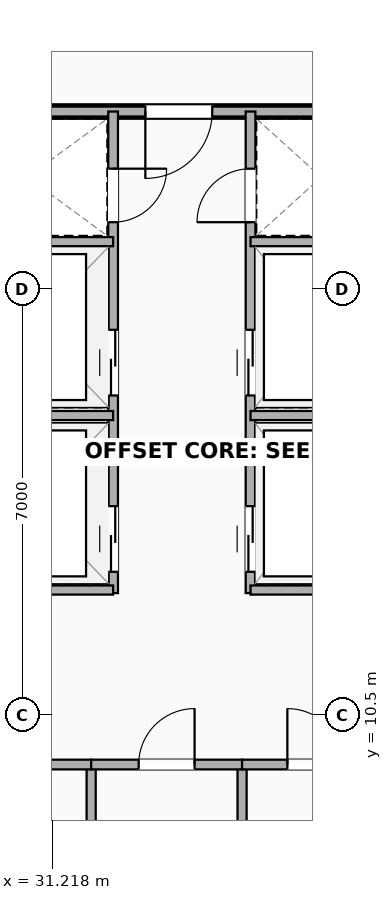
"""IFC4 building model, lengths in metres.
Left out: names, types, materials, properties, quantities, classifications, styles, units other than length and angle.
Written with IfcOpenShell. Run it as: python <this file> out.ifc"""

import sys

from ifc_helpers import new_model, si_unit, direction, frame, frame_2d, origin, place, context, subcontext, project, spatial, rectangle, extrude, element, fill, save


model = new_model("IFC4")
c1 = context("Model", 3, precision=1e-05, world=origin(), true_north=direction((0.0, 1.0)))
c2 = subcontext(c1, "Body", "Model", "MODEL_VIEW")
j1 = project(units=[si_unit("LENGTHUNIT", "METRE"), si_unit("PLANEANGLEUNIT", "RADIAN")], contexts=[c1])
p1 = place(None, origin())
s1 = spatial("IfcSite", under=j1, at=p1, CompositionType="ELEMENT")
p2 = place(p1, origin())
s2 = spatial("IfcBuilding", under=s1, at=p2, CompositionType="ELEMENT")
p3 = place(p2, frame((0.0, 0.0, 95.2)))
s3 = spatial("IfcBuildingStorey", under=s2, at=p3, CompositionType="ELEMENT", Elevation=95.2)
p4 = place(p3, frame((29.2, 20.42, 0.0), z_axis=(0.0, 0.0, 1.0), x_axis=(1.0, 0.0, 0.0)))
e1 = element("IfcWall", 1, at=p4, inside=s3, PredefinedType="PARTITIONING", context=c2, shape_type="SweptSolid", body=[
    extrude(rectangle(XDim=7.8, YDim=0.2, at=frame_2d((3.9, 0.0))), origin(), (0.0, 0.0, 1.0), 2.313),
])
p5 = place(p4, frame((3.55, 0.0, 0.0)))
e2 = element("IfcOpeningElement", 2, at=p5, cuts=e1, PredefinedType="OPENING", context=c2, shape_type="SweptSolid", body=[
    extrude(rectangle(XDim=1.1, YDim=2.15, at=frame_2d((0.55, 1.075))), frame((0.0, 0.11, 0.0), z_axis=(0.0, -1.0, 0.0), x_axis=(1.0, 0.0, 0.0)), (0.0, 0.0, 1.0), 0.22),
])
p6 = place(p3, frame((31.859, 3.95, 0.0), z_axis=(0.0, 0.0, 1.0), x_axis=(0.0, 1.0, 0.0)))
e3 = element("IfcWall", 3, at=p6, inside=s3, PredefinedType="PARTITIONING", context=c2, shape_type="SweptSolid", body=[
    extrude(rectangle(XDim=5.73, YDim=0.15, at=frame_2d((2.865, 0.0))), origin(), (0.0, 0.0, 1.0), 3.24),
])
p7 = place(p3, frame((29.45, 9.68, 0.0), z_axis=(0.0, 0.0, 1.0), x_axis=(1.0, 0.0, 0.0)))
e4 = element("IfcWall", 4, at=p7, inside=s3, PredefinedType="PARTITIONING", context=c2, shape_type="SweptSolid", body=[
    extrude(rectangle(XDim=2.409, YDim=0.16, at=frame_2d((1.205, 0.0))), origin(), (0.0, 0.0, 1.0), 3.24),
])
p8 = place(p7, frame((1.664, 0.0, 0.0), z_axis=(0.0, 0.0, 1.0), x_axis=(-1.0, 0.0, 0.0)))
e5 = element("IfcOpeningElement", 5, at=p8, cuts=e4, PredefinedType="OPENING", context=c2, shape_type="SweptSolid", body=[
    extrude(rectangle(XDim=0.92, YDim=2.08, at=frame_2d((0.46, 1.04))), frame((0.0, 0.09, 0.0), z_axis=(0.0, -1.0, 0.0), x_axis=(1.0, 0.0, 0.0)), (0.0, 0.0, 1.0), 0.18),
])
p9 = place(p3, frame((34.341, 3.95, 0.0), z_axis=(0.0, 0.0, 1.0), x_axis=(0.0, 1.0, 0.0)))
e6 = element("IfcWall", 6, at=p9, inside=s3, PredefinedType="PARTITIONING", context=c2, shape_type="SweptSolid", body=[
    extrude(rectangle(XDim=5.73, YDim=0.15, at=frame_2d((2.865, 0.0))), origin(), (0.0, 0.0, 1.0), 3.24),
])
p10 = place(p3, frame((31.859, 9.68, 0.0), z_axis=(0.0, 0.0, 1.0), x_axis=(1.0, 0.0, 0.0)))
e7 = element("IfcWall", 7, at=p10, inside=s3, PredefinedType="PARTITIONING", context=c2, shape_type="SweptSolid", body=[
    extrude(rectangle(XDim=2.482, YDim=0.16, at=frame_2d((1.241, 0.0))), origin(), (0.0, 0.0, 1.0), 3.24),
])
p11 = place(p10, frame((1.701, 0.0, 0.0), z_axis=(0.0, 0.0, 1.0), x_axis=(-1.0, 0.0, 0.0)))
e8 = element("IfcOpeningElement", 8, at=p11, cuts=e7, PredefinedType="OPENING", context=c2, shape_type="SweptSolid", body=[
    extrude(rectangle(XDim=0.92, YDim=2.08, at=frame_2d((0.46, 1.04))), frame((0.0, 0.09, 0.0), z_axis=(0.0, -1.0, 0.0), x_axis=(1.0, 0.0, 0.0)), (0.0, 0.0, 1.0), 0.18),
])
p12 = place(p3, frame((34.341, 9.68, 0.0), z_axis=(0.0, 0.0, 1.0), x_axis=(1.0, 0.0, 0.0)))
e9 = element("IfcWall", 9, at=p12, inside=s3, PredefinedType="PARTITIONING", context=c2, shape_type="SweptSolid", body=[
    extrude(rectangle(XDim=2.409, YDim=0.16, at=frame_2d((1.205, 0.0))), origin(), (0.0, 0.0, 1.0), 3.24),
])
p13 = place(p12, frame((1.664, 0.0, 0.0), z_axis=(0.0, 0.0, 1.0), x_axis=(-1.0, 0.0, 0.0)))
e10 = element("IfcOpeningElement", 10, at=p13, cuts=e9, PredefinedType="OPENING", context=c2, shape_type="SweptSolid", body=[
    extrude(rectangle(XDim=0.92, YDim=2.08, at=frame_2d((0.46, 1.04))), frame((0.0, 0.09, 0.0), z_axis=(0.0, -1.0, 0.0), x_axis=(1.0, 0.0, 0.0)), (0.0, 0.0, 1.0), 0.18),
])
p14 = place(p3, frame((32.22, 12.5, 0.0), z_axis=(0.0, 0.0, 1.0), x_axis=(0.0, 1.0, 0.0)))
e11 = element("IfcWall", 11, at=p14, inside=s3, PredefinedType="PARTITIONING", context=c2, shape_type="SweptSolid", body=[
    extrude(rectangle(XDim=7.92, YDim=0.16, at=frame_2d((3.96, 0.0))), origin(), (0.0, 0.0, 1.0), 2.614),
])
p15 = place(p14, frame((1.43, 0.0, 0.0), z_axis=(0.0, 0.0, 1.0), x_axis=(-1.0, 0.0, 0.0)))
e12 = element("IfcOpeningElement", 12, at=p15, cuts=e11, PredefinedType="OPENING", context=c2, shape_type="SweptSolid", body=[
    extrude(rectangle(XDim=1.08, YDim=2.16, at=frame_2d((0.54, 1.08))), frame((0.0, 0.09, 0.0), z_axis=(0.0, -1.0, 0.0), x_axis=(1.0, 0.0, 0.0)), (0.0, 0.0, 1.0), 0.18),
])
p16 = place(p14, frame((4.33, 0.0, 0.0), z_axis=(0.0, 0.0, 1.0), x_axis=(-1.0, 0.0, 0.0)))
e13 = element("IfcOpeningElement", 13, at=p16, cuts=e11, PredefinedType="OPENING", context=c2, shape_type="SweptSolid", body=[
    extrude(rectangle(XDim=1.08, YDim=2.16, at=frame_2d((0.54, 1.08))), frame((0.0, 0.09, 0.0), z_axis=(0.0, -1.0, 0.0), x_axis=(1.0, 0.0, 0.0)), (0.0, 0.0, 1.0), 0.18),
])
p17 = place(p14, frame((6.1, 0.0, 0.0)))
e14 = element("IfcOpeningElement", 14, at=p17, cuts=e11, PredefinedType="OPENING", context=c2, shape_type="SweptSolid", body=[
    extrude(rectangle(XDim=0.88, YDim=2.08, at=frame_2d((0.44, 1.04))), frame((0.0, 0.09, 0.0), z_axis=(0.0, -1.0, 0.0), x_axis=(1.0, 0.0, 0.0)), (0.0, 0.0, 1.0), 0.18),
])
p18 = place(p3, frame((34.48, 12.5, 0.0), z_axis=(0.0, 0.0, 1.0), x_axis=(0.0, 1.0, 0.0)))
e15 = element("IfcWall", 15, at=p18, inside=s3, PredefinedType="PARTITIONING", context=c2, shape_type="SweptSolid", body=[
    extrude(rectangle(XDim=7.92, YDim=0.16, at=frame_2d((3.96, 0.0))), origin(), (0.0, 0.0, 1.0), 2.614),
])
p19 = place(p18, frame((0.35, 0.0, 0.0)))
e16 = element("IfcOpeningElement", 16, at=p19, cuts=e15, PredefinedType="OPENING", context=c2, shape_type="SweptSolid", body=[
    extrude(rectangle(XDim=1.08, YDim=2.16, at=frame_2d((0.54, 1.08))), frame((0.0, 0.09, 0.0), z_axis=(0.0, -1.0, 0.0), x_axis=(1.0, 0.0, 0.0)), (0.0, 0.0, 1.0), 0.18),
])
p20 = place(p18, frame((3.25, 0.0, 0.0)))
e17 = element("IfcOpeningElement", 17, at=p20, cuts=e15, PredefinedType="OPENING", context=c2, shape_type="SweptSolid", body=[
    extrude(rectangle(XDim=1.08, YDim=2.16, at=frame_2d((0.54, 1.08))), frame((0.0, 0.09, 0.0), z_axis=(0.0, -1.0, 0.0), x_axis=(1.0, 0.0, 0.0)), (0.0, 0.0, 1.0), 0.18),
])
p21 = place(p18, frame((6.98, 0.0, 0.0), z_axis=(0.0, 0.0, 1.0), x_axis=(-1.0, 0.0, 0.0)))
e18 = element("IfcOpeningElement", 18, at=p21, cuts=e15, PredefinedType="OPENING", context=c2, shape_type="SweptSolid", body=[
    extrude(rectangle(XDim=0.88, YDim=2.08, at=frame_2d((0.44, 1.04))), frame((0.0, 0.09, 0.0), z_axis=(0.0, -1.0, 0.0), x_axis=(1.0, 0.0, 0.0)), (0.0, 0.0, 1.0), 0.18),
])
p22 = place(p3, frame((29.45, 12.55, 0.0), z_axis=(0.0, 0.0, 1.0), x_axis=(1.0, 0.0, 0.0)))
e19 = element("IfcWall", 19, at=p22, inside=s3, PredefinedType="PARTITIONING", context=c2, shape_type="SweptSolid", body=[
    extrude(rectangle(XDim=2.77, YDim=0.15, at=frame_2d((1.385, 0.0))), origin(), (0.0, 0.0, 1.0), 3.24),
])
p23 = place(p3, frame((34.48, 12.55, 0.0), z_axis=(0.0, 0.0, 1.0), x_axis=(1.0, 0.0, 0.0)))
e20 = element("IfcWall", 20, at=p23, inside=s3, PredefinedType="PARTITIONING", context=c2, shape_type="SweptSolid", body=[
    extrude(rectangle(XDim=2.27, YDim=0.15, at=frame_2d((1.135, 0.0))), origin(), (0.0, 0.0, 1.0), 3.24),
])
p24 = place(p3, frame((29.45, 15.42, 0.0), z_axis=(0.0, 0.0, 1.0), x_axis=(1.0, 0.0, 0.0)))
e21 = element("IfcWall", 21, at=p24, inside=s3, PredefinedType="PARTITIONING", context=c2, shape_type="SweptSolid", body=[
    extrude(rectangle(XDim=2.77, YDim=0.15, at=frame_2d((1.385, 0.0))), origin(), (0.0, 0.0, 1.0), 3.24),
])
p25 = place(p3, frame((34.48, 15.42, 0.0), z_axis=(0.0, 0.0, 1.0), x_axis=(1.0, 0.0, 0.0)))
e22 = element("IfcWall", 22, at=p25, inside=s3, PredefinedType="PARTITIONING", context=c2, shape_type="SweptSolid", body=[
    extrude(rectangle(XDim=2.27, YDim=0.15, at=frame_2d((1.135, 0.0))), origin(), (0.0, 0.0, 1.0), 3.24),
])
p26 = place(p3, frame((29.45, 18.28, 0.0), z_axis=(0.0, 0.0, 1.0), x_axis=(1.0, 0.0, 0.0)))
e23 = element("IfcWall", 23, at=p26, inside=s3, PredefinedType="PARTITIONING", context=c2, shape_type="SweptSolid", body=[
    extrude(rectangle(XDim=2.77, YDim=0.15, at=frame_2d((1.385, 0.0))), origin(), (0.0, 0.0, 1.0), 3.24),
])
p27 = place(p3, frame((34.48, 18.28, 0.0), z_axis=(0.0, 0.0, 1.0), x_axis=(1.0, 0.0, 0.0)))
e24 = element("IfcWall", 24, at=p27, inside=s3, PredefinedType="PARTITIONING", context=c2, shape_type="SweptSolid", body=[
    extrude(rectangle(XDim=2.27, YDim=0.15, at=frame_2d((1.135, 0.0))), origin(), (0.0, 0.0, 1.0), 3.24),
])
p28 = place(p5, origin())
e25 = element("IfcDoor", 25, at=p28, inside=s3, OperationType="SINGLE_SWING_LEFT", PredefinedType="DOOR", context=c2, shape_type="SweptSolid", body=[
    extrude(rectangle(XDim=1.1, YDim=2.15, at=frame_2d((0.55, 1.075))), frame((0.0, 0.025, 0.0), z_axis=(0.0, -1.0, 0.0), x_axis=(1.0, 0.0, 0.0)), (0.0, 0.0, 1.0), 0.05),
])
fill(e2, e25)
p29 = place(p11, origin())
e26 = element("IfcDoor", 26, at=p29, inside=s3, OperationType="SINGLE_SWING_RIGHT", PredefinedType="DOOR", context=c2, shape_type="SweptSolid", body=[
    extrude(rectangle(XDim=0.92, YDim=2.08, at=frame_2d((0.46, 1.04))), frame((0.0, 0.025, 0.0), z_axis=(0.0, -1.0, 0.0), x_axis=(1.0, 0.0, 0.0)), (0.0, 0.0, 1.0), 0.05),
])
fill(e8, e26)
p30 = place(p13, origin())
e27 = element("IfcDoor", 27, at=p30, inside=s3, OperationType="SINGLE_SWING_LEFT", PredefinedType="DOOR", context=c2, shape_type="SweptSolid", body=[
    extrude(rectangle(XDim=0.92, YDim=2.08, at=frame_2d((0.46, 1.04))), frame((0.0, 0.025, 0.0), z_axis=(0.0, -1.0, 0.0), x_axis=(1.0, 0.0, 0.0)), (0.0, 0.0, 1.0), 0.05),
])
fill(e10, e27)
p31 = place(p15, origin())
e28 = element("IfcDoor", 28, at=p31, inside=s3, OperationType="DOUBLE_DOOR_SLIDING", PredefinedType="DOOR", context=c2, shape_type="SweptSolid", body=[
    extrude(rectangle(XDim=1.08, YDim=2.16, at=frame_2d((0.54, 1.08))), frame((0.0, 0.025, 0.0), z_axis=(0.0, -1.0, 0.0), x_axis=(1.0, 0.0, 0.0)), (0.0, 0.0, 1.0), 0.05),
])
fill(e12, e28)
p32 = place(p16, origin())
e29 = element("IfcDoor", 29, at=p32, inside=s3, OperationType="DOUBLE_DOOR_SLIDING", PredefinedType="DOOR", context=c2, shape_type="SweptSolid", body=[
    extrude(rectangle(XDim=1.08, YDim=2.16, at=frame_2d((0.54, 1.08))), frame((0.0, 0.025, 0.0), z_axis=(0.0, -1.0, 0.0), x_axis=(1.0, 0.0, 0.0)), (0.0, 0.0, 1.0), 0.05),
])
fill(e13, e29)
p33 = place(p17, origin())
e30 = element("IfcDoor", 30, at=p33, inside=s3, OperationType="SINGLE_SWING_RIGHT", PredefinedType="DOOR", context=c2, shape_type="SweptSolid", body=[
    extrude(rectangle(XDim=0.88, YDim=2.08, at=frame_2d((0.44, 1.04))), frame((0.0, 0.025, 0.0), z_axis=(0.0, -1.0, 0.0), x_axis=(1.0, 0.0, 0.0)), (0.0, 0.0, 1.0), 0.05),
])
fill(e14, e30)
p34 = place(p19, origin())
e31 = element("IfcDoor", 31, at=p34, inside=s3, OperationType="DOUBLE_DOOR_SLIDING", PredefinedType="DOOR", context=c2, shape_type="SweptSolid", body=[
    extrude(rectangle(XDim=1.08, YDim=2.16, at=frame_2d((0.54, 1.08))), frame((0.0, 0.025, 0.0), z_axis=(0.0, -1.0, 0.0), x_axis=(1.0, 0.0, 0.0)), (0.0, 0.0, 1.0), 0.05),
])
fill(e16, e31)
p35 = place(p20, origin())
e32 = element("IfcDoor", 32, at=p35, inside=s3, OperationType="DOUBLE_DOOR_SLIDING", PredefinedType="DOOR", context=c2, shape_type="SweptSolid", body=[
    extrude(rectangle(XDim=1.08, YDim=2.16, at=frame_2d((0.54, 1.08))), frame((0.0, 0.025, 0.0), z_axis=(0.0, -1.0, 0.0), x_axis=(1.0, 0.0, 0.0)), (0.0, 0.0, 1.0), 0.05),
])
fill(e17, e32)
p36 = place(p21, origin())
e33 = element("IfcDoor", 33, at=p36, inside=s3, OperationType="SINGLE_SWING_LEFT", PredefinedType="DOOR", context=c2, shape_type="SweptSolid", body=[
    extrude(rectangle(XDim=0.88, YDim=2.08, at=frame_2d((0.44, 1.04))), frame((0.0, 0.025, 0.0), z_axis=(0.0, -1.0, 0.0), x_axis=(1.0, 0.0, 0.0)), (0.0, 0.0, 1.0), 0.05),
])
fill(e18, e33)
save(model, sys.argv[1])
